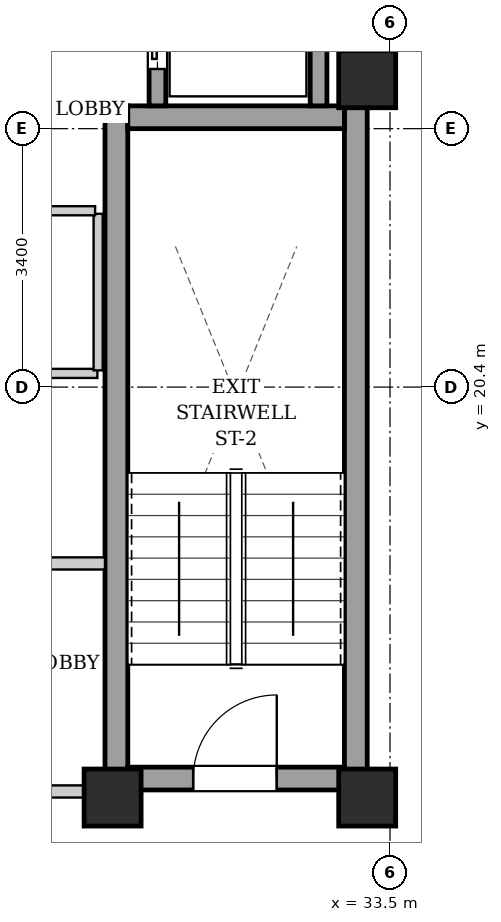
"""IFC4 building model, lengths in metres.
Left out: names, types, materials, properties, quantities, classifications, styles, units other than length and angle.
Written with IfcOpenShell. Run it as: python <this file> out.ifc"""

import sys

from ifc_helpers import new_model, si_unit, direction, frame, frame_2d, origin, origin_2d, place, context, subcontext, project, spatial, rectangle, extrude, element, fill, save


model = new_model("IFC4")
c1 = context("Model", 3, precision=1e-05, world=origin(), true_north=direction((0.0, 1.0)))
c2 = subcontext(c1, "Body", "Model", "MODEL_VIEW")
j1 = project(units=[si_unit("LENGTHUNIT", "METRE"), si_unit("PLANEANGLEUNIT", "RADIAN")], contexts=[c1])
p1 = place(None, origin())
s1 = spatial("IfcSite", under=j1, at=p1, CompositionType="ELEMENT")
p2 = place(p1, origin())
s2 = spatial("IfcBuilding", under=s1, at=p2, CompositionType="ELEMENT")
p3 = place(p2, frame((0.0, 0.0, 247.9)))
s3 = spatial("IfcBuildingStorey", under=s2, at=p3, CompositionType="ELEMENT", Elevation=247.9)
for number, where, z_axis, x_axis in (
    (1, (29.85, 15.0, 0.0), (0.0, 0.0, 1.0), (1.0, 0.0, 0.0)),
    (2, (33.2, 15.0, 0.0), (0.0, 0.0, 1.0), (1.0, 0.0, 0.0)),
    (3, (33.2, 24.45, 0.0), (0.0, 0.0, 1.0), (1.0, 0.0, 0.0)),
):
    element("IfcColumn", number, at=place(p3, frame(where, z_axis=z_axis, x_axis=x_axis)), inside=s3, PredefinedType="COLUMN", context=c2, shape_type="SweptSolid", body=[
        extrude(rectangle(XDim=0.75, YDim=0.75, at=origin_2d()), origin(), (0.0, 0.0, 1.0), 3.4),
    ])
for number, where, z_axis, x_axis in (
    (4, (29.9, 15.1, 0.0), (0.0, 0.0, 1.0), (0.0, 1.0, 0.0)),
    (5, (33.05, 15.1, 0.0), (0.0, 0.0, 1.0), (0.0, 1.0, 0.0)),
):
    element("IfcWall", number, at=place(p3, frame(where, z_axis=z_axis, x_axis=x_axis)), inside=s3, PredefinedType="SHEAR", context=c2, shape_type="SweptSolid", body=[
        extrude(rectangle(XDim=9.0, YDim=0.3, at=frame_2d((4.5, 0.0))), origin(), (0.0, 0.0, 1.0), 3.14),
    ])
p4 = place(p3, frame((30.05, 23.95, 0.0), z_axis=(0.0, 0.0, 1.0), x_axis=(1.0, 0.0, 0.0)))
e6 = element("IfcWall", 6, at=p4, inside=s3, PredefinedType="SHEAR", context=c2, shape_type="SweptSolid", body=[
    extrude(rectangle(XDim=2.85, YDim=0.3, at=frame_2d((1.425, 0.0))), origin(), (0.0, 0.0, 1.0), 3.14),
])
p5 = place(p3, frame((30.05, 15.25, 0.0), z_axis=(0.0, 0.0, 1.0), x_axis=(1.0, 0.0, 0.0)))
e7 = element("IfcWall", 7, at=p5, inside=s3, PredefinedType="SHEAR", context=c2, shape_type="SweptSolid", body=[
    extrude(rectangle(XDim=2.85, YDim=0.3, at=frame_2d((1.425, 0.0))), origin(), (0.0, 0.0, 1.0), 3.14),
])
p6 = place(p5, frame((0.86, 0.0, 0.0)))
e8 = element("IfcOpeningElement", 8, at=p6, cuts=e7, PredefinedType="OPENING", context=c2, shape_type="SweptSolid", body=[
    extrude(rectangle(XDim=1.1, YDim=2.05, at=frame_2d((0.55, 1.025))), frame((0.0, 0.16, 0.0), z_axis=(0.0, -1.0, 0.0), x_axis=(1.0, 0.0, 0.0)), (0.0, 0.0, 1.0), 0.32),
])
p7 = place(p3, frame((30.44, 24.1, 0.0), z_axis=(0.0, 0.0, 1.0), x_axis=(0.0, 1.0, 0.0)))
e9 = element("IfcWall", 9, at=p7, inside=s3, PredefinedType="SHEAR", context=c2, shape_type="SweptSolid", body=[
    extrude(rectangle(XDim=2.07, YDim=0.22, at=frame_2d((1.035, 0.0))), origin(), (0.0, 0.0, 1.0), 3.14),
])
p8 = place(p7, frame((0.485, 0.0, 0.0)))
e10 = element("IfcOpeningElement", 10, at=p8, cuts=e9, PredefinedType="OPENING", context=c2, shape_type="SweptSolid", body=[
    extrude(rectangle(XDim=1.1, YDim=2.15, at=frame_2d((0.55, 1.075))), frame((0.0, 0.12, 0.0), z_axis=(0.0, -1.0, 0.0), x_axis=(1.0, 0.0, 0.0)), (0.0, 0.0, 1.0), 0.24),
])
p9 = place(p3, frame((32.56, 24.1, 0.0), z_axis=(0.0, 0.0, 1.0), x_axis=(0.0, 1.0, 0.0)))
e11 = element("IfcWall", 11, at=p9, inside=s3, PredefinedType="SHEAR", context=c2, shape_type="SweptSolid", body=[
    extrude(rectangle(XDim=2.07, YDim=0.22, at=frame_2d((1.035, 0.0))), origin(), (0.0, 0.0, 1.0), 3.14),
])
p10 = place(p3, frame((21.25, 15.08, 0.0), z_axis=(0.0, 0.0, 1.0), x_axis=(1.0, 0.0, 0.0)))
e12 = element("IfcWall", 12, at=p10, inside=s3, PredefinedType="PARTITIONING", context=c2, shape_type="SweptSolid", body=[
    extrude(rectangle(XDim=8.5, YDim=0.16, at=frame_2d((4.25, 0.0))), origin(), (0.0, 0.0, 1.0), 2.668),
])
p11 = place(p10, frame((3.725, 0.0, 0.0)))
e13 = element("IfcOpeningElement", 13, at=p11, cuts=e12, PredefinedType="OPENING", context=c2, shape_type="SweptSolid", body=[
    extrude(rectangle(XDim=1.05, YDim=2.05, at=frame_2d((0.525, 1.025))), frame((0.0, 0.09, 0.0), z_axis=(0.0, -1.0, 0.0), x_axis=(1.0, 0.0, 0.0)), (0.0, 0.0, 1.0), 0.18),
])
p12 = place(p3, frame((28.65, 18.08, 0.0), z_axis=(0.0, 0.0, 1.0), x_axis=(1.0, 0.0, 0.0)))
e14 = element("IfcWall", 14, at=p12, inside=s3, PredefinedType="PARTITIONING", context=c2, shape_type="SweptSolid", body=[
    extrude(rectangle(XDim=1.1, YDim=0.16, at=frame_2d((0.55, 0.0))), origin(), (0.0, 0.0, 1.0), 3.14),
])
p13 = place(p3, frame((33.12, 24.12, 0.0), z_axis=(0.0, 0.0, 1.0), x_axis=(0.0, 1.0, 0.0)))
e15 = element("IfcWall", 15, at=p13, inside=s3, PredefinedType="PARTITIONING", context=c2, shape_type="SweptSolid", body=[
    extrude(rectangle(XDim=4.76, YDim=0.16, at=frame_2d((2.38, 0.0))), origin(), (0.0, 0.0, 1.0), 2.475),
])
p14 = place(p3, frame((22.3, 20.58, 0.0), z_axis=(0.0, 0.0, 1.0), x_axis=(1.0, 0.0, 0.0)))
e16 = element("IfcWall", 16, at=p14, inside=s3, PredefinedType="PARTITIONING", context=c2, shape_type="SweptSolid", body=[
    extrude(rectangle(XDim=7.35, YDim=0.12, at=frame_2d((3.675, 0.0))), origin(), (0.0, 0.0, 1.0), 3.14),
])
p15 = place(p3, frame((29.66, 20.62, 0.0), z_axis=(0.0, 0.0, 1.0), x_axis=(0.0, 1.0, 0.0)))
e17 = element("IfcWall", 17, at=p15, inside=s3, PredefinedType="PARTITIONING", context=c2, shape_type="SweptSolid", body=[
    extrude(rectangle(XDim=2.06, YDim=0.12, at=frame_2d((1.03, 0.0))), origin(), (0.0, 0.0, 1.0), 3.14),
])
p16 = place(p3, frame((22.35, 22.72, 0.0), z_axis=(0.0, 0.0, 1.0), x_axis=(1.0, 0.0, 0.0)))
e18 = element("IfcWall", 18, at=p16, inside=s3, PredefinedType="PARTITIONING", context=c2, shape_type="SweptSolid", body=[
    extrude(rectangle(XDim=7.27, YDim=0.12, at=frame_2d((3.635, 0.0))), origin(), (0.0, 0.0, 1.0), 3.14),
])
p17 = place(p16, frame((3.25, 0.0, 0.0)))
e19 = element("IfcOpeningElement", 19, at=p17, cuts=e18, PredefinedType="OPENING", context=c2, shape_type="SweptSolid", body=[
    extrude(rectangle(XDim=0.9, YDim=2.05, at=frame_2d((0.45, 1.025))), frame((0.0, 0.07, 0.0), z_axis=(0.0, -1.0, 0.0), x_axis=(1.0, 0.0, 0.0)), (0.0, 0.0, 1.0), 0.14),
])
p18 = place(p6, origin())
e20 = element("IfcDoor", 20, at=p18, inside=s3, OperationType="SINGLE_SWING_RIGHT", PredefinedType="DOOR", context=c2, shape_type="SweptSolid", body=[
    extrude(rectangle(XDim=1.1, YDim=2.05, at=frame_2d((0.55, 1.025))), frame((0.0, 0.025, 0.0), z_axis=(0.0, -1.0, 0.0), x_axis=(1.0, 0.0, 0.0)), (0.0, 0.0, 1.0), 0.05),
])
fill(e8, e20)
p19 = place(p8, origin())
e21 = element("IfcDoor", 21, at=p19, inside=s3, OperationType="SLIDING_TO_LEFT", PredefinedType="DOOR", context=c2, shape_type="SweptSolid", body=[
    extrude(rectangle(XDim=1.1, YDim=2.15, at=frame_2d((0.55, 1.075))), frame((0.0, 0.025, 0.0), z_axis=(0.0, -1.0, 0.0), x_axis=(1.0, 0.0, 0.0)), (0.0, 0.0, 1.0), 0.05),
])
fill(e10, e21)
save(model, sys.argv[1])
